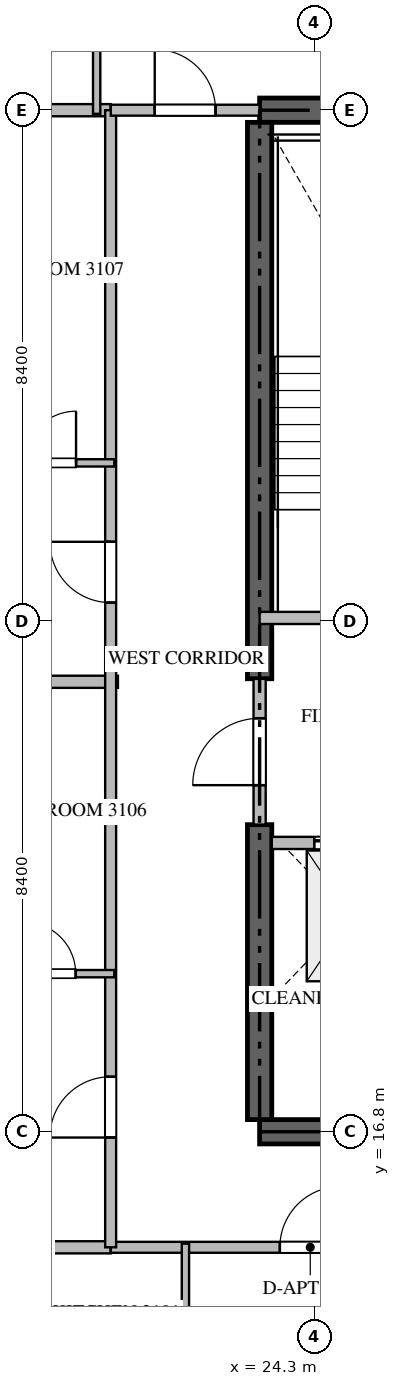
"""IFC4 building model, lengths in metres.
Left out: names, types, materials, properties, quantities, classifications, styles, units other than length and angle.
Written with IfcOpenShell. Run it as: python <this file> out.ifc"""

import sys

from ifc_helpers import new_model, si_unit, direction, frame, frame_2d, origin, place, context, subcontext, project, spatial, rectangle, extrude, source, transform, mapped, element, fill, save


model = new_model("IFC4")
c1 = context("Model", 3, precision=1e-05, world=origin(), true_north=direction((0.0, 1.0)))
c2 = subcontext(c1, "Body", "Model", "MODEL_VIEW")
j1 = project(units=[si_unit("LENGTHUNIT", "METRE"), si_unit("PLANEANGLEUNIT", "RADIAN")], contexts=[c1])
p1 = place(None, origin())
s1 = spatial("IfcSite", under=j1, at=p1, CompositionType="ELEMENT")
p2 = place(p1, origin())
s2 = spatial("IfcBuilding", under=s1, at=p2, CompositionType="ELEMENT")
p3 = place(p2, frame((0.0, 0.0, 127.65)))
s3 = spatial("IfcBuildingStorey", under=s2, at=p3, CompositionType="ELEMENT", Elevation=127.65)
for number, where, z_axis, x_axis in (
    (1, (23.4, 16.8, -0.26), (0.0, 0.0, 1.0), (1.0, 0.0, 0.0)),
    (2, (41.4, 33.6, -0.26), (0.0, 0.0, 1.0), (-1.0, 0.0, 0.0)),
):
    element("IfcWall", number, at=place(p3, frame(where, z_axis=z_axis, x_axis=x_axis)), inside=s3, PredefinedType="SHEAR", context=c2, shape_type="SweptSolid", body=[
        extrude(rectangle(XDim=18.0, YDim=0.4, at=frame_2d((9.0, 0.0))), origin(), (0.0, 0.0, 1.0), 3.748),
    ])
p4 = place(p3, frame((23.4, 17.0, -0.26), z_axis=(0.0, 0.0, 1.0), x_axis=(0.0, 1.0, 0.0)))
e3 = element("IfcWall", 3, at=p4, inside=s3, PredefinedType="SHEAR", context=c2, shape_type="SweptSolid", body=[
    extrude(rectangle(XDim=4.85, YDim=0.4, at=frame_2d((2.425, 0.0))), origin(), (0.0, 0.0, 1.0), 3.748),
])
p5 = place(p3, frame((23.4, 24.25, -0.26), z_axis=(0.0, 0.0, 1.0), x_axis=(0.0, 1.0, 0.0)))
e4 = element("IfcWall", 4, at=p5, inside=s3, PredefinedType="SHEAR", context=c2, shape_type="SweptSolid", body=[
    extrude(rectangle(XDim=9.15, YDim=0.4, at=frame_2d((4.575, 0.0))), origin(), (0.0, 0.0, 1.0), 3.748),
])
p6 = place(p3, frame((23.4, 25.25, 0.0), z_axis=(0.0, 0.0, 1.0), x_axis=(1.0, 0.0, 0.0)))
e5 = element("IfcWall", 5, at=p6, inside=s3, PredefinedType="STANDARD", context=c2, shape_type="SweptSolid", body=[
    extrude(rectangle(XDim=4.45, YDim=0.2, at=frame_2d((2.225, 0.0))), origin(), (0.0, 0.0, 1.0), 3.49),
])
p7 = place(p6, frame((1.65, 0.0, 0.0)))
e6 = element("IfcOpeningElement", 6, at=p7, cuts=e5, PredefinedType="OPENING", context=c2, shape_type="SweptSolid", body=[
    extrude(rectangle(XDim=1.1, YDim=2.15, at=frame_2d((0.55, 1.075))), frame((0.0, 0.11, 0.0), z_axis=(0.0, -1.0, 0.0), x_axis=(1.0, 0.0, 0.0)), (0.0, 0.0, 1.0), 0.22),
])
p8 = place(p3, frame((23.6, 21.55, 0.0), z_axis=(0.0, 0.0, 1.0), x_axis=(1.0, 0.0, 0.0)))
e7 = element("IfcWall", 7, at=p8, inside=s3, PredefinedType="STANDARD", context=c2, shape_type="SweptSolid", body=[
    extrude(rectangle(XDim=2.45, YDim=0.2, at=frame_2d((1.225, 0.0))), origin(), (0.0, 0.0, 1.0), 3.49),
])
p9 = place(p8, frame((0.7, 0.0, 0.0)))
e8 = element("IfcOpeningElement", 8, at=p9, cuts=e7, PredefinedType="OPENING", context=c2, shape_type="SweptSolid", body=[
    extrude(rectangle(XDim=1.2, YDim=2.2, at=frame_2d((0.6, 1.1))), frame((0.0, 0.11, 0.0), z_axis=(0.0, -1.0, 0.0), x_axis=(1.0, 0.0, 0.0)), (0.0, 0.0, 1.0), 0.22),
])
p10 = place(p3, frame((23.6, 19.05, 0.0), z_axis=(0.0, 0.0, 1.0), x_axis=(1.0, 0.0, 0.0)))
e9 = element("IfcWall", 9, at=p10, inside=s3, PredefinedType="STANDARD", context=c2, shape_type="SweptSolid", body=[
    extrude(rectangle(XDim=2.45, YDim=0.2, at=frame_2d((1.225, 0.0))), origin(), (0.0, 0.0, 1.0), 3.49),
])
p11 = place(p3, frame((23.4, 21.852, 0.0), z_axis=(0.0, 0.0, 1.0), x_axis=(0.0, 1.0, 0.0)))
e10 = element("IfcWall", 10, at=p11, inside=s3, PredefinedType="STANDARD", context=c2, shape_type="SweptSolid", body=[
    extrude(rectangle(XDim=2.396, YDim=0.2, at=frame_2d((1.198, 0.0))), origin(), (0.0, 0.0, 1.0), 3.49),
])
p12 = place(p11, frame((0.648, 0.0, 0.0)))
e11 = element("IfcOpeningElement", 11, at=p12, cuts=e10, PredefinedType="OPENING", context=c2, shape_type="SweptSolid", body=[
    extrude(rectangle(XDim=1.1, YDim=2.15, at=frame_2d((0.55, 1.075))), frame((0.0, 0.11, 0.0), z_axis=(0.0, -1.0, 0.0), x_axis=(1.0, 0.0, 0.0)), (0.0, 0.0, 1.0), 0.22),
])
p13 = place(p3, frame((7.882, 24.2, 0.0), z_axis=(0.0, 0.0, 1.0), x_axis=(1.0, 0.0, 0.0)))
e12 = element("IfcWall", 12, at=p13, inside=s3, PredefinedType="PARTITIONING", context=c2, shape_type="SweptSolid", body=[
    extrude(rectangle(XDim=13.188, YDim=0.2, at=frame_2d((6.594, 0.0))), origin(), (0.0, 0.0, 1.0), 3.49),
])
for number, where, z_axis, x_axis in (
    (13, (7.882, 14.9, 0.0), (0.0, 0.0, 1.0), (1.0, 0.0, 0.0)),
    (14, (7.882, 33.6, 0.0), (0.0, 0.0, 1.0), (1.0, 0.0, 0.0)),
):
    element("IfcWall", number, at=place(p3, frame(where, z_axis=z_axis, x_axis=x_axis)), inside=s3, PredefinedType="PARTITIONING", context=c2, shape_type="SweptSolid", body=[
        extrude(rectangle(XDim=13.068, YDim=0.2, at=frame_2d((6.534, 0.0))), origin(), (0.0, 0.0, 1.0), 3.49),
    ])
p14 = place(p3, frame((20.952, 14.9, 0.0), z_axis=(0.0, 0.0, 1.0), x_axis=(1.0, 0.0, 0.0)))
e15 = element("IfcWall", 15, at=p14, inside=s3, PredefinedType="PARTITIONING", context=c2, shape_type="SweptSolid", body=[
    extrude(rectangle(XDim=22.896, YDim=0.18, at=frame_2d((11.448, 0.0))), origin(), (0.0, 0.0, 1.0), 3.49),
])
p15 = place(p14, frame((2.781, 0.0, 0.0)))
e16 = element("IfcOpeningElement", 16, at=p15, cuts=e15, PredefinedType="OPENING", context=c2, shape_type="SweptSolid", body=[
    extrude(rectangle(XDim=1.0, YDim=2.15, at=frame_2d((0.5, 1.075))), frame((0.0, 0.1, 0.0), z_axis=(0.0, -1.0, 0.0), x_axis=(1.0, 0.0, 0.0)), (0.0, 0.0, 1.0), 0.2),
])
p16 = place(p14, frame((7.16, 0.0, 0.0)))
e17 = element("IfcOpeningElement", 17, at=p16, cuts=e15, PredefinedType="OPENING", context=c2, shape_type="SweptSolid", body=[
    extrude(rectangle(XDim=1.0, YDim=2.15, at=frame_2d((0.5, 1.075))), frame((0.0, 0.1, 0.0), z_axis=(0.0, -1.0, 0.0), x_axis=(1.0, 0.0, 0.0)), (0.0, 0.0, 1.0), 0.2),
])
p17 = place(p14, frame((19.115, 0.0, 0.0)))
e18 = element("IfcOpeningElement", 18, at=p17, cuts=e15, PredefinedType="OPENING", context=c2, shape_type="SweptSolid", body=[
    extrude(rectangle(XDim=1.0, YDim=2.15, at=frame_2d((0.5, 1.075))), frame((0.0, 0.1, 0.0), z_axis=(0.0, -1.0, 0.0), x_axis=(1.0, 0.0, 0.0)), (0.0, 0.0, 1.0), 0.2),
])
p18 = place(p3, frame((20.95, 14.9, 0.0), z_axis=(0.0, 0.0, 1.0), x_axis=(0.0, 1.0, 0.0)))
e19 = element("IfcWall", 19, at=p18, inside=s3, PredefinedType="PARTITIONING", context=c2, shape_type="SweptSolid", body=[
    extrude(rectangle(XDim=18.7, YDim=0.18, at=frame_2d((9.35, 0.0))), origin(), (0.0, 0.0, 1.0), 3.49),
])
p19 = place(p18, frame((1.805, 0.0, 0.0)))
e20 = element("IfcOpeningElement", 20, at=p19, cuts=e19, PredefinedType="OPENING", context=c2, shape_type="SweptSolid", body=[
    extrude(rectangle(XDim=1.0, YDim=2.15, at=frame_2d((0.5, 1.075))), frame((0.0, 0.1, 0.0), z_axis=(0.0, -1.0, 0.0), x_axis=(1.0, 0.0, 0.0)), (0.0, 0.0, 1.0), 0.2),
])
p20 = place(p18, frame((10.602, 0.0, 0.0)))
e21 = element("IfcOpeningElement", 21, at=p20, cuts=e19, PredefinedType="OPENING", context=c2, shape_type="SweptSolid", body=[
    extrude(rectangle(XDim=1.0, YDim=2.15, at=frame_2d((0.5, 1.075))), frame((0.0, 0.1, 0.0), z_axis=(0.0, -1.0, 0.0), x_axis=(1.0, 0.0, 0.0)), (0.0, 0.0, 1.0), 0.2),
])
p21 = place(p3, frame((20.952, 33.6, 0.0), z_axis=(0.0, 0.0, 1.0), x_axis=(1.0, 0.0, 0.0)))
e22 = element("IfcWall", 22, at=p21, inside=s3, PredefinedType="PARTITIONING", context=c2, shape_type="SweptSolid", body=[
    extrude(rectangle(XDim=2.446, YDim=0.18, at=frame_2d((1.223, 0.0))), origin(), (0.0, 0.0, 1.0), 3.49),
])
p22 = place(p21, frame((0.723, 0.0, 0.0)))
e23 = element("IfcOpeningElement", 23, at=p22, cuts=e22, PredefinedType="OPENING", context=c2, shape_type="SweptSolid", body=[
    extrude(rectangle(XDim=1.0, YDim=2.15, at=frame_2d((0.5, 1.075))), frame((0.0, 0.1, 0.0), z_axis=(0.0, -1.0, 0.0), x_axis=(1.0, 0.0, 0.0)), (0.0, 0.0, 1.0), 0.2),
])
for number, where, z_axis, x_axis in (
    (24, (22.18, 12.15, 0.0), (0.0, 0.0, 1.0), (0.0, 1.0, 0.0)),
    (25, (20.72, 36.35, 0.0), (0.0, 0.0, 1.0), (0.0, -1.0, 0.0)),
):
    element("IfcWall", number, at=place(p3, frame(where, z_axis=z_axis, x_axis=x_axis)), inside=s3, PredefinedType="PARTITIONING", context=c2, shape_type="SweptSolid", body=[
        extrude(rectangle(XDim=2.81, YDim=0.12, at=frame_2d((1.405, 0.0))), origin(), (0.0, 0.0, 1.0), 3.49),
    ])
p23 = place(p3, frame((18.889, 19.4, 0.0), z_axis=(0.0, 0.0, 1.0), x_axis=(1.0, 0.0, 0.0)))
e26 = element("IfcWall", 26, at=p23, inside=s3, PredefinedType="PARTITIONING", context=c2, shape_type="SweptSolid", body=[
    extrude(rectangle(XDim=2.121, YDim=0.12, at=frame_2d((1.061, 0.0))), origin(), (0.0, 0.0, 1.0), 3.49),
])
p24 = place(p23, frame((0.636, 0.0, 0.0)))
e27 = element("IfcOpeningElement", 27, at=p24, cuts=e26, PredefinedType="OPENING", context=c2, shape_type="SweptSolid", body=[
    extrude(rectangle(XDim=0.85, YDim=2.1, at=frame_2d((0.425, 1.05))), frame((0.0, 0.07, 0.0), z_axis=(0.0, -1.0, 0.0), x_axis=(1.0, 0.0, 0.0)), (0.0, 0.0, 1.0), 0.14),
])
p25 = place(p3, frame((18.902, 27.8, 0.0), z_axis=(0.0, 0.0, 1.0), x_axis=(1.0, 0.0, 0.0)))
e28 = element("IfcWall", 28, at=p25, inside=s3, PredefinedType="PARTITIONING", context=c2, shape_type="SweptSolid", body=[
    extrude(rectangle(XDim=2.108, YDim=0.12, at=frame_2d((1.054, 0.0))), origin(), (0.0, 0.0, 1.0), 3.49),
])
p26 = place(p25, frame((0.629, 0.0, 0.0)))
e29 = element("IfcOpeningElement", 29, at=p26, cuts=e28, PredefinedType="OPENING", context=c2, shape_type="SweptSolid", body=[
    extrude(rectangle(XDim=0.85, YDim=2.1, at=frame_2d((0.425, 1.05))), frame((0.0, 0.07, 0.0), z_axis=(0.0, -1.0, 0.0), x_axis=(1.0, 0.0, 0.0)), (0.0, 0.0, 1.0), 0.14),
])
m1 = source(origin(), c2, "Body", "SweptSolid", [
    extrude(rectangle(XDim=1.2, YDim=2.2, at=frame_2d((0.6, 1.1))), frame((0.0, 0.025, 0.0), z_axis=(0.0, -1.0, 0.0), x_axis=(1.0, 0.0, 0.0)), (0.0, 0.0, 1.0), 0.05),
])
p27 = place(p9, origin())
e30 = element("IfcDoor", 30, at=p27, inside=s3, OperationType="DOUBLE_DOOR_SLIDING", PredefinedType="DOOR", context=c2, shape_type="MappedRepresentation", body=[
    mapped(m1, transform((0.0, 0.0, 0.0), scale=1.0)),
])
fill(e8, e30)
m2 = source(origin(), c2, "Body", "SweptSolid", [
    extrude(rectangle(XDim=1.1, YDim=2.15, at=frame_2d((0.55, 1.075))), frame((0.0, 0.025, 0.0), z_axis=(0.0, -1.0, 0.0), x_axis=(1.0, 0.0, 0.0)), (0.0, 0.0, 1.0), 0.05),
])
p28 = place(p12, origin())
e31 = element("IfcDoor", 31, at=p28, inside=s3, OperationType="SINGLE_SWING_LEFT", PredefinedType="DOOR", context=c2, shape_type="MappedRepresentation", body=[
    mapped(m2, transform((0.0, 0.0, 0.0), scale=1.0)),
])
fill(e11, e31)
m3 = source(origin(), c2, "Body", "SweptSolid", [
    extrude(rectangle(XDim=1.0, YDim=2.15, at=frame_2d((0.5, 1.075))), frame((0.0, 0.025, 0.0), z_axis=(0.0, -1.0, 0.0), x_axis=(1.0, 0.0, 0.0)), (0.0, 0.0, 1.0), 0.05),
])
p29 = place(p15, origin())
e32 = element("IfcDoor", 32, at=p29, inside=s3, OperationType="SINGLE_SWING_RIGHT", PredefinedType="DOOR", context=c2, shape_type="MappedRepresentation", body=[
    mapped(m3, transform((0.0, 0.0, 0.0), scale=1.0)),
])
fill(e16, e32)
p30 = place(p19, origin())
e33 = element("IfcDoor", 33, at=p30, inside=s3, OperationType="SINGLE_SWING_LEFT", PredefinedType="DOOR", context=c2, shape_type="MappedRepresentation", body=[
    mapped(m3, transform((0.0, 0.0, 0.0), scale=1.0)),
])
fill(e20, e33)
p31 = place(p20, origin())
e34 = element("IfcDoor", 34, at=p31, inside=s3, OperationType="SINGLE_SWING_RIGHT", PredefinedType="DOOR", context=c2, shape_type="MappedRepresentation", body=[
    mapped(m3, transform((0.0, 0.0, 0.0), scale=1.0)),
])
fill(e21, e34)
p32 = place(p22, origin())
e35 = element("IfcDoor", 35, at=p32, inside=s3, OperationType="SINGLE_SWING_LEFT", PredefinedType="DOOR", context=c2, shape_type="MappedRepresentation", body=[
    mapped(m3, transform((0.0, 0.0, 0.0), scale=1.0)),
])
fill(e23, e35)
m4 = source(origin(), c2, "Body", "SweptSolid", [
    extrude(rectangle(XDim=0.85, YDim=2.1, at=frame_2d((0.425, 1.05))), frame((0.0, 0.025, 0.0), z_axis=(0.0, -1.0, 0.0), x_axis=(1.0, 0.0, 0.0)), (0.0, 0.0, 1.0), 0.05),
])
p33 = place(p24, origin())
e36 = element("IfcDoor", 36, at=p33, inside=s3, OperationType="SINGLE_SWING_LEFT", PredefinedType="DOOR", context=c2, shape_type="MappedRepresentation", body=[
    mapped(m4, transform((0.0, 0.0, 0.0), scale=1.0)),
])
fill(e27, e36)
p34 = place(p26, origin())
e37 = element("IfcDoor", 37, at=p34, inside=s3, OperationType="SINGLE_SWING_RIGHT", PredefinedType="DOOR", context=c2, shape_type="MappedRepresentation", body=[
    mapped(m4, transform((0.0, 0.0, 0.0), scale=1.0)),
])
fill(e29, e37)
save(model, sys.argv[1])
